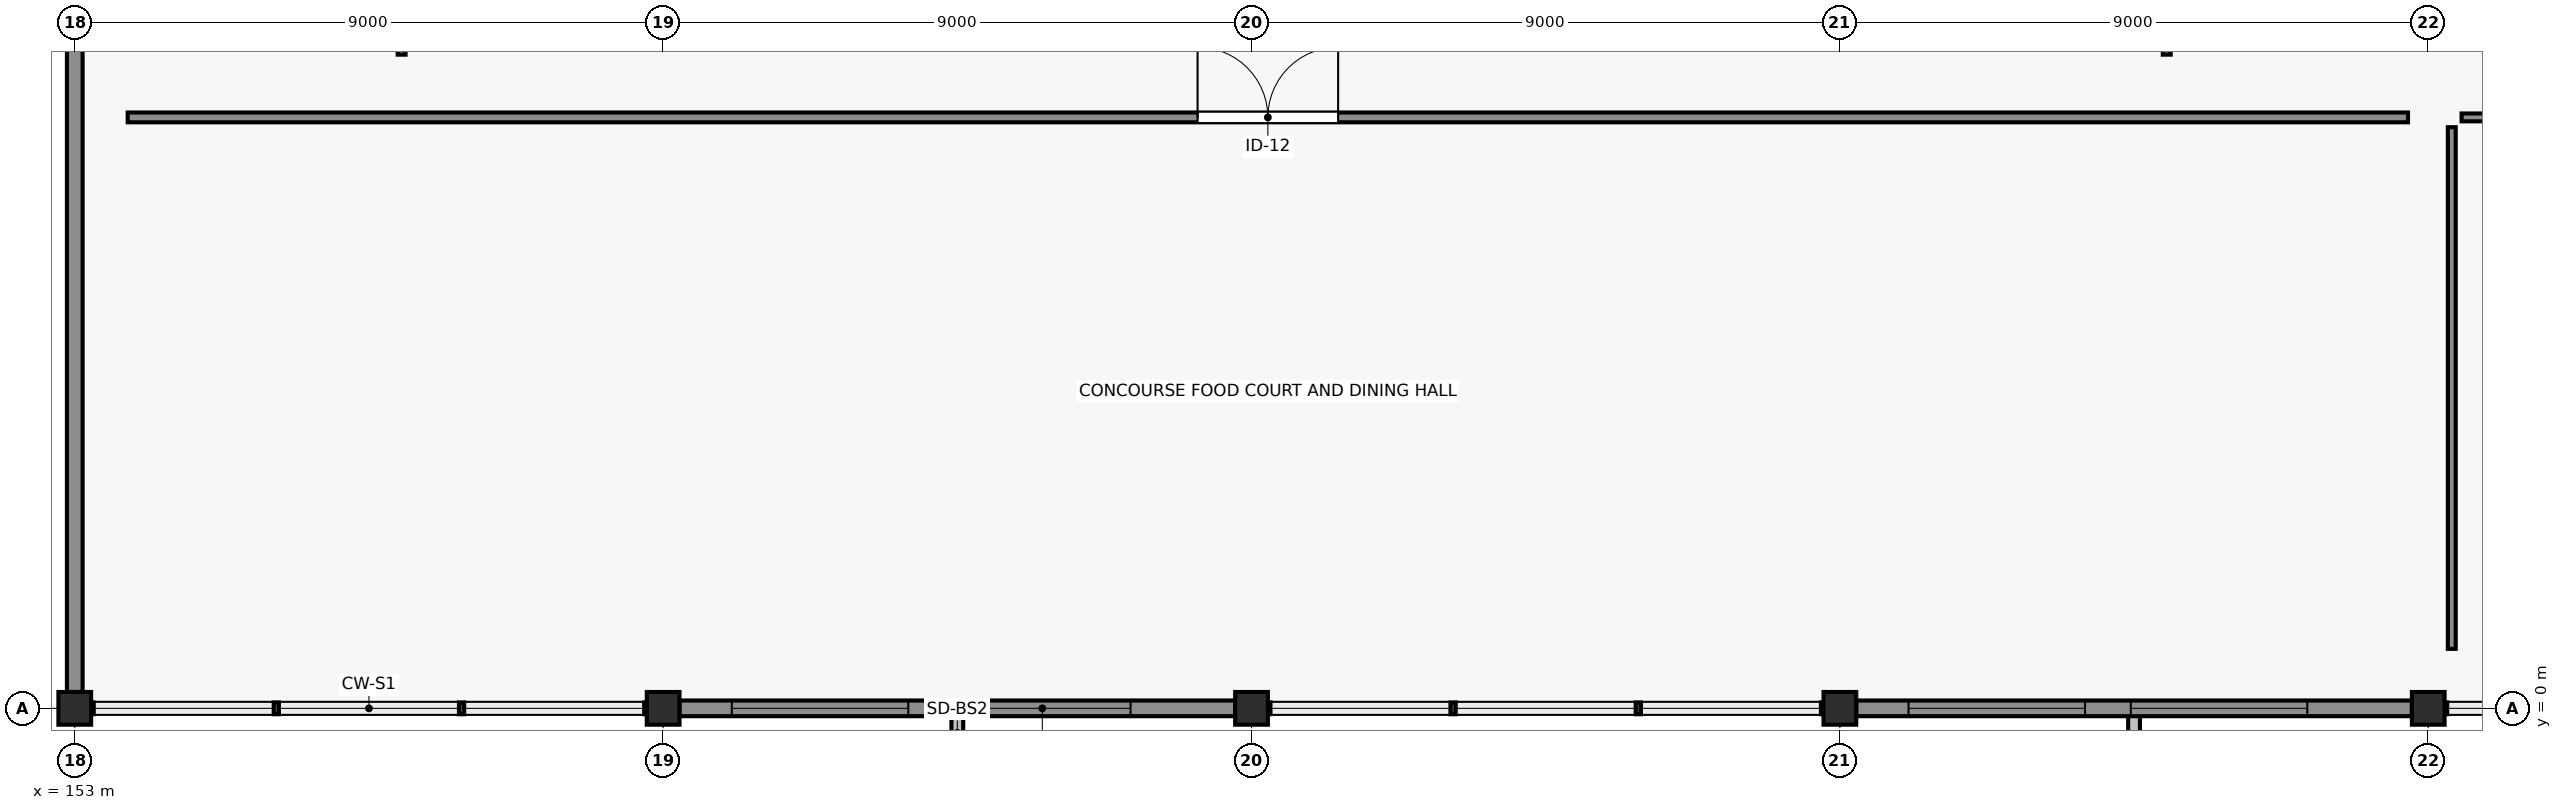
"""IFC4 building model, lengths in metres.
Left out: names, types, materials, properties, quantities, classifications, styles, units other than length and angle.
Written with IfcOpenShell. Run it as: python <this file> out.ifc"""

import sys

from ifc_helpers import new_model, si_unit, direction, frame, frame_2d, origin, origin_2d, place, context, subcontext, project, spatial, rectangle, extrude, element, fill, save


model = new_model("IFC4")
c1 = context("Model", 3, precision=1e-05, world=origin(), true_north=direction((0.0, 1.0)))
c2 = subcontext(c1, "Body", "Model", "MODEL_VIEW")
j1 = project(units=[si_unit("LENGTHUNIT", "METRE"), si_unit("PLANEANGLEUNIT", "RADIAN")], contexts=[c1])
p1 = place(None, origin())
s1 = spatial("IfcSite", under=j1, at=p1, CompositionType="ELEMENT")
p2 = place(p1, origin())
s2 = spatial("IfcBuilding", under=s1, at=p2, CompositionType="ELEMENT")
p3 = place(p2, frame((0.0, 0.0, 9.8)))
s3 = spatial("IfcBuildingStorey", under=s2, at=p3, CompositionType="ELEMENT", Elevation=9.8)
for number, where, z_axis, x_axis in (
    (1, (153.0, 0.0, 0.0), (0.0, 0.0, 1.0), (1.0, 0.0, 0.0)),
    (2, (162.0, 0.0, 0.0), (0.0, 0.0, 1.0), (1.0, 0.0, 0.0)),
    (3, (171.0, 0.0, 0.0), (0.0, 0.0, 1.0), (1.0, 0.0, 0.0)),
    (4, (180.0, 0.0, 0.0), (0.0, 0.0, 1.0), (1.0, 0.0, 0.0)),
    (5, (189.0, 0.0, 0.0), (0.0, 0.0, 1.0), (1.0, 0.0, 0.0)),
):
    element("IfcColumn", number, at=place(p3, frame(where, z_axis=z_axis, x_axis=x_axis)), inside=s3, PredefinedType="COLUMN", context=c2, shape_type="SweptSolid", body=[
        extrude(rectangle(XDim=0.5, YDim=0.5, at=origin_2d()), origin(), (0.0, 0.0, 1.0), 4.87),
    ])
p4 = place(p3, frame((170.75, 0.0, 0.0), z_axis=(0.0, 0.0, 1.0), x_axis=(-1.0, 0.0, 0.0)))
e6 = element("IfcWall", 6, at=p4, inside=s3, PredefinedType="SOLIDWALL", context=c2, shape_type="SweptSolid", body=[
    extrude(rectangle(XDim=8.5, YDim=0.24, at=frame_2d((4.25, 0.0))), origin(), (0.0, 0.0, 1.0), 4.39),
])
p5 = place(p4, frame((1.6, 0.0, 1.0)))
e7 = element("IfcOpeningElement", 7, at=p5, cuts=e6, PredefinedType="OPENING", context=c2, shape_type="SweptSolid", body=[
    extrude(rectangle(XDim=2.7, YDim=1.8, at=frame_2d((1.35, 0.9))), frame((0.0, 0.13, 0.0), z_axis=(0.0, -1.0, 0.0), x_axis=(1.0, 0.0, 0.0)), (0.0, 0.0, 1.0), 0.26),
])
p6 = place(p4, frame((5.0, 0.0, 1.0)))
e8 = element("IfcOpeningElement", 8, at=p6, cuts=e6, PredefinedType="OPENING", context=c2, shape_type="SweptSolid", body=[
    extrude(rectangle(XDim=2.7, YDim=1.8, at=frame_2d((1.35, 0.9))), frame((0.0, 0.13, 0.0), z_axis=(0.0, -1.0, 0.0), x_axis=(1.0, 0.0, 0.0)), (0.0, 0.0, 1.0), 0.26),
])
p7 = place(p3, frame((188.75, 0.0, 0.0), z_axis=(0.0, 0.0, 1.0), x_axis=(-1.0, 0.0, 0.0)))
e9 = element("IfcWall", 9, at=p7, inside=s3, PredefinedType="SOLIDWALL", context=c2, shape_type="SweptSolid", body=[
    extrude(rectangle(XDim=8.5, YDim=0.24, at=frame_2d((4.25, 0.0))), origin(), (0.0, 0.0, 1.0), 4.39),
])
p8 = place(p7, frame((1.6, 0.0, 1.0)))
e10 = element("IfcOpeningElement", 10, at=p8, cuts=e9, PredefinedType="OPENING", context=c2, shape_type="SweptSolid", body=[
    extrude(rectangle(XDim=2.7, YDim=1.8, at=frame_2d((1.35, 0.9))), frame((0.0, 0.13, 0.0), z_axis=(0.0, -1.0, 0.0), x_axis=(1.0, 0.0, 0.0)), (0.0, 0.0, 1.0), 0.26),
])
p9 = place(p7, frame((5.0, 0.0, 1.0)))
e11 = element("IfcOpeningElement", 11, at=p9, cuts=e9, PredefinedType="OPENING", context=c2, shape_type="SweptSolid", body=[
    extrude(rectangle(XDim=2.7, YDim=1.8, at=frame_2d((1.35, 0.9))), frame((0.0, 0.13, 0.0), z_axis=(0.0, -1.0, 0.0), x_axis=(1.0, 0.0, 0.0)), (0.0, 0.0, 1.0), 0.26),
])
p10 = place(p3, frame((153.0, 0.25, 0.0), z_axis=(0.0, 0.0, 1.0), x_axis=(0.0, 1.0, 0.0)))
e12 = element("IfcWall", 12, at=p10, inside=s3, PredefinedType="SOLIDWALL", context=c2, shape_type="SweptSolid", body=[
    extrude(rectangle(XDim=10.5, YDim=0.24, at=frame_2d((5.25, 0.0))), origin(), (0.0, 0.0, 1.0), 4.39),
])
p11 = place(p3, frame((153.81, 9.04, 0.0), z_axis=(0.0, 0.0, 1.0), x_axis=(1.0, 0.0, 0.0)))
e13 = element("IfcWall", 13, at=p11, inside=s3, PredefinedType="PARTITIONING", context=c2, shape_type="SweptSolid", body=[
    extrude(rectangle(XDim=34.88, YDim=0.15, at=frame_2d((17.44, 0.0))), origin(), (0.0, 0.0, 1.0), 4.44),
])
p12 = place(p11, frame((16.365, 0.0, 0.0)))
e14 = element("IfcOpeningElement", 14, at=p12, cuts=e13, PredefinedType="OPENING", context=c2, shape_type="SweptSolid", body=[
    extrude(rectangle(XDim=2.15, YDim=2.4, at=frame_2d((1.075, 1.2))), frame((0.0, 0.085, 0.0), z_axis=(0.0, -1.0, 0.0), x_axis=(1.0, 0.0, 0.0)), (0.0, 0.0, 1.0), 0.17),
])
p13 = place(p3, frame((189.51, 9.04, 0.0), z_axis=(0.0, 0.0, 1.0), x_axis=(1.0, 0.0, 0.0)))
e15 = element("IfcWall", 15, at=p13, inside=s3, PredefinedType="PARTITIONING", context=c2, shape_type="SweptSolid", body=[
    extrude(rectangle(XDim=16.68, YDim=0.12, at=frame_2d((8.34, 0.0))), origin(), (0.0, 0.0, 1.0), 4.44),
])
p14 = place(p13, frame((7.84, 0.0, 0.0)))
e16 = element("IfcOpeningElement", 16, at=p14, cuts=e15, PredefinedType="OPENING", context=c2, shape_type="SweptSolid", body=[
    extrude(rectangle(XDim=1.0, YDim=2.15, at=frame_2d((0.5, 1.075))), frame((0.0, 0.07, 0.0), z_axis=(0.0, -1.0, 0.0), x_axis=(1.0, 0.0, 0.0)), (0.0, 0.0, 1.0), 0.14),
])
p15 = place(p3, frame((189.36, 0.91, 0.0), z_axis=(0.0, 0.0, 1.0), x_axis=(0.0, 1.0, 0.0)))
e17 = element("IfcWall", 17, at=p15, inside=s3, PredefinedType="PARTITIONING", context=c2, shape_type="SweptSolid", body=[
    extrude(rectangle(XDim=7.98, YDim=0.12, at=frame_2d((3.99, 0.0))), origin(), (0.0, 0.0, 1.0), 4.8),
])
p16 = place(p3, frame((158.0, 10.0, 0.0), z_axis=(0.0, 0.0, 1.0), x_axis=(0.0, 1.0, 0.0)))
e18 = element("IfcWall", 18, at=p16, inside=s3, PredefinedType="PARTITIONING", context=c2, shape_type="SweptSolid", body=[
    extrude(rectangle(XDim=7.2, YDim=0.12, at=frame_2d((3.6, 0.0))), origin(), (0.0, 0.0, 1.0), 4.44),
])
p17 = place(p16, frame((3.0, 0.0, 0.0)))
e19 = element("IfcOpeningElement", 19, at=p17, cuts=e18, PredefinedType="OPENING", context=c2, shape_type="SweptSolid", body=[
    extrude(rectangle(XDim=1.0, YDim=2.15, at=frame_2d((0.5, 1.075))), frame((0.0, 0.07, 0.0), z_axis=(0.0, -1.0, 0.0), x_axis=(1.0, 0.0, 0.0)), (0.0, 0.0, 1.0), 0.14),
])
p18 = place(p3, frame((185.0, 10.0, 0.0), z_axis=(0.0, 0.0, 1.0), x_axis=(0.0, 1.0, 0.0)))
e20 = element("IfcWall", 20, at=p18, inside=s3, PredefinedType="PARTITIONING", context=c2, shape_type="SweptSolid", body=[
    extrude(rectangle(XDim=7.2, YDim=0.12, at=frame_2d((3.6, 0.0))), origin(), (0.0, 0.0, 1.0), 4.44),
])
p19 = place(p18, frame((3.0, 0.0, 0.0)))
e21 = element("IfcOpeningElement", 21, at=p19, cuts=e20, PredefinedType="OPENING", context=c2, shape_type="SweptSolid", body=[
    extrude(rectangle(XDim=1.0, YDim=2.15, at=frame_2d((0.5, 1.075))), frame((0.0, 0.07, 0.0), z_axis=(0.0, -1.0, 0.0), x_axis=(1.0, 0.0, 0.0)), (0.0, 0.0, 1.0), 0.14),
])
p20 = place(p5, origin())
e22 = element("IfcWindow", 22, at=p20, inside=s3, PartitioningType="SINGLE_PANEL", PredefinedType="WINDOW", context=c2, shape_type="SweptSolid", body=[
    extrude(rectangle(XDim=2.7, YDim=1.8, at=frame_2d((1.35, 0.9))), frame((0.0, 0.03, 0.0), z_axis=(0.0, -1.0, 0.0), x_axis=(1.0, 0.0, 0.0)), (0.0, 0.0, 1.0), 0.06),
])
fill(e7, e22)
p21 = place(p6, origin())
e23 = element("IfcWindow", 23, at=p21, inside=s3, PartitioningType="SINGLE_PANEL", PredefinedType="WINDOW", context=c2, shape_type="SweptSolid", body=[
    extrude(rectangle(XDim=2.7, YDim=1.8, at=frame_2d((1.35, 0.9))), frame((0.0, 0.03, 0.0), z_axis=(0.0, -1.0, 0.0), x_axis=(1.0, 0.0, 0.0)), (0.0, 0.0, 1.0), 0.06),
])
fill(e8, e23)
p22 = place(p8, origin())
e24 = element("IfcWindow", 24, at=p22, inside=s3, PartitioningType="SINGLE_PANEL", PredefinedType="WINDOW", context=c2, shape_type="SweptSolid", body=[
    extrude(rectangle(XDim=2.7, YDim=1.8, at=frame_2d((1.35, 0.9))), frame((0.0, 0.03, 0.0), z_axis=(0.0, -1.0, 0.0), x_axis=(1.0, 0.0, 0.0)), (0.0, 0.0, 1.0), 0.06),
])
fill(e10, e24)
p23 = place(p9, origin())
e25 = element("IfcWindow", 25, at=p23, inside=s3, PartitioningType="SINGLE_PANEL", PredefinedType="WINDOW", context=c2, shape_type="SweptSolid", body=[
    extrude(rectangle(XDim=2.7, YDim=1.8, at=frame_2d((1.35, 0.9))), frame((0.0, 0.03, 0.0), z_axis=(0.0, -1.0, 0.0), x_axis=(1.0, 0.0, 0.0)), (0.0, 0.0, 1.0), 0.06),
])
fill(e11, e25)
p24 = place(p12, origin())
e26 = element("IfcDoor", 26, at=p24, inside=s3, OperationType="DOUBLE_DOOR_SINGLE_SWING", PredefinedType="DOOR", context=c2, shape_type="SweptSolid", body=[
    extrude(rectangle(XDim=2.15, YDim=2.4, at=frame_2d((1.075, 1.2))), frame((0.0, 0.025, 0.0), z_axis=(0.0, -1.0, 0.0), x_axis=(1.0, 0.0, 0.0)), (0.0, 0.0, 1.0), 0.05),
])
fill(e14, e26)
save(model, sys.argv[1])
